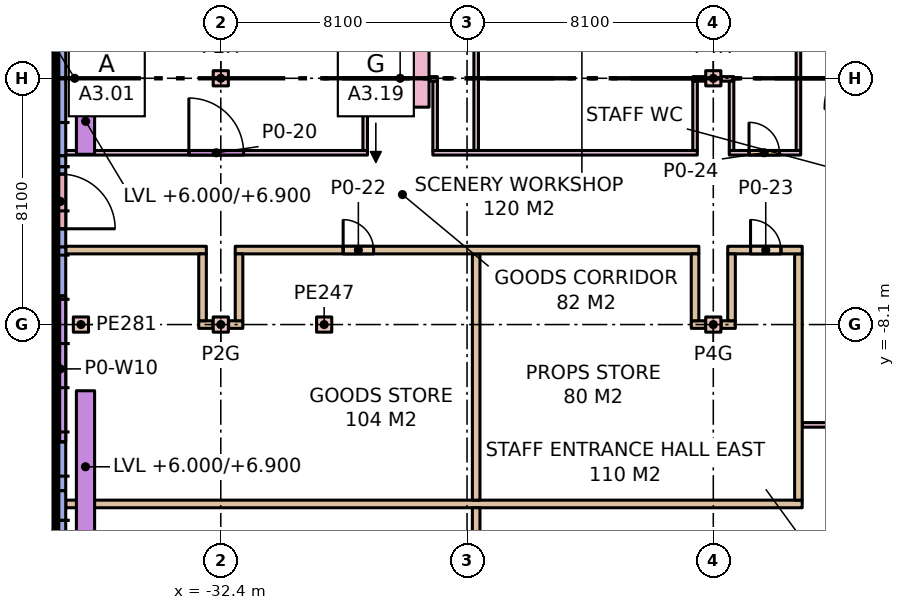
"""IFC4 building model, lengths in metres.
Left out: names, types, materials, properties, quantities, classifications, styles, units other than length and angle.
Written with IfcOpenShell. Run it as: python <this file> out.ifc"""

import sys

from ifc_helpers import new_model, si_unit, direction, frame, frame_2d, origin, origin_2d, place, context, subcontext, project, spatial, rectangle, extrude, element, fill, save


model = new_model("IFC4")
c1 = context("Model", 3, precision=1e-05, world=origin(), true_north=direction((0.0, 1.0)))
c2 = subcontext(c1, "Body", "Model", "MODEL_VIEW")
j1 = project(units=[si_unit("LENGTHUNIT", "METRE"), si_unit("PLANEANGLEUNIT", "RADIAN")], contexts=[c1])
p1 = place(None, origin())
s1 = spatial("IfcSite", under=j1, at=p1, CompositionType="ELEMENT")
p2 = place(p1, origin())
s2 = spatial("IfcBuilding", under=s1, at=p2, CompositionType="ELEMENT")
p3 = place(p2, origin())
s3 = spatial("IfcBuildingStorey", under=s2, at=p3, CompositionType="ELEMENT", Elevation=0.0)
for number, where, z_axis, x_axis in (
    (1, (-32.4, -8.1, 0.0), (0.0, 0.0, 1.0), (1.0, 0.0, 0.0)),
    (2, (-32.4, 0.0, 0.0), (0.0, 0.0, 1.0), (1.0, 0.0, 0.0)),
    (3, (-16.2, -8.1, 0.0), (0.0, 0.0, 1.0), (1.0, 0.0, 0.0)),
    (4, (-16.2, 0.0, 0.0), (0.0, 0.0, 1.0), (1.0, 0.0, 0.0)),
    (5, (-29.0, -8.1, 0.0), (0.0, 0.0, 1.0), (1.0, 0.0, 0.0)),
    (6, (-37.0, 0.0, 0.0), (0.0, 0.0, 1.0), (1.0, 0.0, 0.0)),
    (7, (-37.0, -8.1, 0.0), (0.0, 0.0, 1.0), (1.0, 0.0, 0.0)),
):
    element("IfcColumn", number, at=place(p3, frame(where, z_axis=z_axis, x_axis=x_axis)), inside=s3, PredefinedType="COLUMN", context=c2, shape_type="SweptSolid", body=[
        extrude(rectangle(XDim=0.5, YDim=0.5, at=origin_2d()), origin(), (0.0, 0.0, 1.0), 6.0),
    ])
p4 = place(p3, frame((-26.5, 0.0, 0.0), z_axis=(0.0, 0.0, 1.0), x_axis=(0.0, -1.0, 0.0)))
e8 = element("IfcColumn", 8, at=p4, inside=s3, PredefinedType="COLUMN", context=c2, shape_type="SweptSolid", body=[
    extrude(rectangle(XDim=1.9, YDim=1.9, at=origin_2d()), origin(), (0.0, 0.0, 1.0), 6.0),
])
p5 = place(p3, frame((-37.675, 1.2, 0.0), z_axis=(0.0, 0.0, 1.0), x_axis=(0.0, -1.0, 0.0)))
e9 = element("IfcWall", 9, at=p5, inside=s3, PredefinedType="STANDARD", context=c2, shape_type="SweptSolid", body=[
    extrude(rectangle(XDim=3.75, YDim=0.35, at=frame_2d((1.875, 0.0))), origin(), (0.0, 0.0, 1.0), 5.68),
])
p6 = place(p3, frame((-37.675, -2.55, 0.0), z_axis=(0.0, 0.0, 1.0), x_axis=(0.0, -1.0, 0.0)))
e10 = element("IfcWall", 10, at=p6, inside=s3, PredefinedType="STANDARD", context=c2, shape_type="SweptSolid", body=[
    extrude(rectangle(XDim=3.0, YDim=0.35, at=frame_2d((1.5, 0.0))), origin(), (0.0, 0.0, 1.0), 5.68),
])
p7 = place(p6, frame((0.6, 0.0, 0.0)))
e11 = element("IfcOpeningElement", 11, at=p7, cuts=e10, PredefinedType="OPENING", context=c2, shape_type="SweptSolid", body=[
    extrude(rectangle(XDim=1.8, YDim=2.4, at=frame_2d((0.9, 1.2))), frame((0.0, 0.185, 0.0), z_axis=(0.0, -1.0, 0.0), x_axis=(1.0, 0.0, 0.0)), (0.0, 0.0, 1.0), 0.37),
])
p8 = place(p3, frame((-37.675, -5.55, 0.0), z_axis=(0.0, 0.0, 1.0), x_axis=(0.0, -1.0, 0.0)))
e12 = element("IfcWall", 12, at=p8, inside=s3, PredefinedType="STANDARD", context=c2, shape_type="SweptSolid", body=[
    extrude(rectangle(XDim=8.017, YDim=0.35, at=frame_2d((4.008, 0.0))), origin(), (0.0, 0.0, 1.0), 5.68),
])
p9 = place(p8, frame((1.608, 0.0, 0.3)))
e13 = element("IfcOpeningElement", 13, at=p9, cuts=e12, PredefinedType="OPENING", context=c2, shape_type="SweptSolid", body=[
    extrude(rectangle(XDim=4.8, YDim=4.5, at=frame_2d((2.4, 2.25))), frame((0.0, 0.185, 0.0), z_axis=(0.0, -1.0, 0.0), x_axis=(1.0, 0.0, 0.0)), (0.0, 0.0, 1.0), 0.37),
])
p10 = place(p3, frame((-37.675, -13.567, 0.0), z_axis=(0.0, 0.0, 1.0), x_axis=(0.0, -1.0, 0.0)))
e14 = element("IfcWall", 14, at=p10, inside=s3, PredefinedType="STANDARD", context=c2, shape_type="SweptSolid", body=[
    extrude(rectangle(XDim=8.017, YDim=0.35, at=frame_2d((4.008, 0.0))), origin(), (0.0, 0.0, 1.0), 5.68),
])
p11 = place(p10, frame((1.608, 0.0, 0.3)))
e15 = element("IfcOpeningElement", 15, at=p11, cuts=e14, PredefinedType="OPENING", context=c2, shape_type="SweptSolid", body=[
    extrude(rectangle(XDim=4.8, YDim=4.5, at=frame_2d((2.4, 2.25))), frame((0.0, 0.185, 0.0), z_axis=(0.0, -1.0, 0.0), x_axis=(1.0, 0.0, 0.0)), (0.0, 0.0, 1.0), 0.37),
])
for number, where, z_axis, x_axis in (
    (16, (-36.85, 2.5, 6.0), (0.0, 0.0, 1.0), (0.0, -1.0, 0.0)),
    (17, (-36.85, -10.277, 6.0), (0.0, 0.0, 1.0), (0.0, -1.0, 0.0)),
):
    element("IfcWall", number, at=place(p3, frame(where, z_axis=z_axis, x_axis=x_axis)), inside=s3, PredefinedType="PARAPET", context=c2, shape_type="SweptSolid", body=[
        extrude(rectangle(XDim=5.0, YDim=0.6, at=frame_2d((2.5, 0.0))), origin(), (0.0, 0.0, 1.0), 0.9),
    ])
p12 = place(p3, frame((-37.5, -14.0, 0.0), z_axis=(0.0, 0.0, 1.0), x_axis=(1.0, 0.0, 0.0)))
e18 = element("IfcWall", 18, at=p12, inside=s3, PredefinedType="PARTITIONING", context=c2, shape_type="SweptSolid", body=[
    extrude(rectangle(XDim=24.225, YDim=0.25, at=frame_2d((12.113, 0.0))), origin(), (0.0, 0.0, 1.0), 5.68),
])
p13 = place(p3, frame((-24.0, -15.94, 0.0), z_axis=(0.0, 0.0, 1.0), x_axis=(0.0, 1.0, 0.0)))
e19 = element("IfcWall", 19, at=p13, inside=s3, PredefinedType="PARTITIONING", context=c2, shape_type="SweptSolid", body=[
    extrude(rectangle(XDim=1.815, YDim=0.25, at=frame_2d((0.907, 0.0))), origin(), (0.0, 0.0, 1.0), 5.68),
])
p14 = place(p3, frame((-24.0, -2.375, 0.0), z_axis=(0.0, 0.0, 1.0), x_axis=(0.0, 1.0, 0.0)))
e20 = element("IfcWall", 20, at=p14, inside=s3, PredefinedType="PARTITIONING", context=c2, shape_type="SweptSolid", body=[
    extrude(rectangle(XDim=16.25, YDim=0.15, at=frame_2d((8.125, 0.0))), origin(), (0.0, 0.0, 1.0), 5.68),
])
p15 = place(p3, frame((-37.5, -2.45, 0.0), z_axis=(0.0, 0.0, 1.0), x_axis=(1.0, 0.0, 0.0)))
e21 = element("IfcWall", 21, at=p15, inside=s3, PredefinedType="PARTITIONING", context=c2, shape_type="SweptSolid", body=[
    extrude(rectangle(XDim=9.925, YDim=0.15, at=frame_2d((4.962, 0.0))), origin(), (0.0, 0.0, 1.0), 5.68),
])
p16 = place(p15, frame((4.05, 0.0, 0.0)))
e22 = element("IfcOpeningElement", 22, at=p16, cuts=e21, PredefinedType="OPENING", context=c2, shape_type="SweptSolid", body=[
    extrude(rectangle(XDim=1.8, YDim=2.4, at=frame_2d((0.9, 1.2))), frame((0.0, 0.085, 0.0), z_axis=(0.0, -1.0, 0.0), x_axis=(1.0, 0.0, 0.0)), (0.0, 0.0, 1.0), 0.17),
])
p17 = place(p3, frame((-25.425, -2.45, 0.0), z_axis=(0.0, 0.0, 1.0), x_axis=(1.0, 0.0, 0.0)))
e23 = element("IfcWall", 23, at=p17, inside=s3, PredefinedType="PARTITIONING", context=c2, shape_type="SweptSolid", body=[
    extrude(rectangle(XDim=8.7, YDim=0.15, at=frame_2d((4.35, 0.0))), origin(), (0.0, 0.0, 1.0), 5.68),
])
for number, where, z_axis, x_axis in (
    (24, (-27.725, -0.02, 0.0), (0.0, 0.0, 1.0), (1.0, 0.0, 0.0)),
    (25, (-25.54, -0.02, 0.0), (0.0, 0.0, 1.0), (1.0, 0.0, 0.0)),
):
    element("IfcWall", number, at=place(p3, frame(where, z_axis=z_axis, x_axis=x_axis)), inside=s3, PredefinedType="PARTITIONING", context=c2, shape_type="SweptSolid", body=[
        extrude(rectangle(XDim=0.265, YDim=0.15, at=frame_2d((0.133, 0.0))), origin(), (0.0, 0.0, 1.0), 5.68),
    ])
for number, where, z_axis, x_axis in (
    (26, (-27.65, -2.375, 0.0), (0.0, 0.0, 1.0), (0.0, 1.0, 0.0)),
    (27, (-25.35, -2.375, 0.0), (0.0, 0.0, 1.0), (0.0, 1.0, 0.0)),
):
    element("IfcWall", number, at=place(p3, frame(where, z_axis=z_axis, x_axis=x_axis)), inside=s3, PredefinedType="PARTITIONING", context=c2, shape_type="SweptSolid", body=[
        extrude(rectangle(XDim=2.28, YDim=0.15, at=frame_2d((1.14, 0.0))), origin(), (0.0, 0.0, 1.0), 5.68),
    ])
p18 = place(p3, frame((-24.0, -13.875, 0.0), z_axis=(0.0, 0.0, 1.0), x_axis=(0.0, 1.0, 0.0)))
e28 = element("IfcWall", 28, at=p18, inside=s3, PredefinedType="PARTITIONING", context=c2, shape_type="SweptSolid", body=[
    extrude(rectangle(XDim=8.1, YDim=0.25, at=frame_2d((4.05, 0.0))), origin(), (0.0, 0.0, 1.0), 5.68),
])
p19 = place(p3, frame((-33.125, -8.1, 0.0), z_axis=(0.0, 0.0, 1.0), x_axis=(1.0, 0.0, 0.0)))
e29 = element("IfcWall", 29, at=p19, inside=s3, PredefinedType="PARTITIONING", context=c2, shape_type="SweptSolid", body=[
    extrude(rectangle(XDim=0.465, YDim=0.25, at=frame_2d((0.232, 0.0))), origin(), (0.0, 0.0, 1.0), 5.68),
])
p20 = place(p3, frame((-32.14, -8.1, 0.0), z_axis=(0.0, 0.0, 1.0), x_axis=(1.0, 0.0, 0.0)))
e30 = element("IfcWall", 30, at=p20, inside=s3, PredefinedType="PARTITIONING", context=c2, shape_type="SweptSolid", body=[
    extrude(rectangle(XDim=0.465, YDim=0.25, at=frame_2d((0.232, 0.0))), origin(), (0.0, 0.0, 1.0), 5.68),
])
p21 = place(p3, frame((-37.5, -5.65, 0.0), z_axis=(0.0, 0.0, 1.0), x_axis=(1.0, 0.0, 0.0)))
e31 = element("IfcWall", 31, at=p21, inside=s3, PredefinedType="PARTITIONING", context=c2, shape_type="SweptSolid", body=[
    extrude(rectangle(XDim=4.625, YDim=0.25, at=frame_2d((2.312, 0.0))), origin(), (0.0, 0.0, 1.0), 5.68),
])
p22 = place(p3, frame((-31.925, -5.65, 0.0), z_axis=(0.0, 0.0, 1.0), x_axis=(1.0, 0.0, 0.0)))
e32 = element("IfcWall", 32, at=p22, inside=s3, PredefinedType="PARTITIONING", context=c2, shape_type="SweptSolid", body=[
    extrude(rectangle(XDim=15.25, YDim=0.25, at=frame_2d((7.625, 0.0))), origin(), (0.0, 0.0, 1.0), 5.68),
])
p23 = place(p22, frame((3.55, 0.0, 0.0)))
e33 = element("IfcOpeningElement", 33, at=p23, cuts=e32, PredefinedType="OPENING", context=c2, shape_type="SweptSolid", body=[
    extrude(rectangle(XDim=1.0, YDim=2.1, at=frame_2d((0.5, 1.05))), frame((0.0, 0.135, 0.0), z_axis=(0.0, -1.0, 0.0), x_axis=(1.0, 0.0, 0.0)), (0.0, 0.0, 1.0), 0.27),
])
for number, where, z_axis, x_axis in (
    (34, (-33.0, -7.975, 0.0), (0.0, 0.0, 1.0), (0.0, 1.0, 0.0)),
    (35, (-31.8, -7.975, 0.0), (0.0, 0.0, 1.0), (0.0, 1.0, 0.0)),
):
    element("IfcWall", number, at=place(p3, frame(where, z_axis=z_axis, x_axis=x_axis)), inside=s3, PredefinedType="PARTITIONING", context=c2, shape_type="SweptSolid", body=[
        extrude(rectangle(XDim=2.2, YDim=0.25, at=frame_2d((1.1, 0.0))), origin(), (0.0, 0.0, 1.0), 5.68),
    ])
p24 = place(p3, frame((-13.4, -13.875, 0.0), z_axis=(0.0, 0.0, 1.0), x_axis=(0.0, 1.0, 0.0)))
e36 = element("IfcWall", 36, at=p24, inside=s3, PredefinedType="PARTITIONING", context=c2, shape_type="SweptSolid", body=[
    extrude(rectangle(XDim=8.1, YDim=0.25, at=frame_2d((4.05, 0.0))), origin(), (0.0, 0.0, 1.0), 5.68),
])
p25 = place(p3, frame((-16.925, -8.1, 0.0), z_axis=(0.0, 0.0, 1.0), x_axis=(1.0, 0.0, 0.0)))
e37 = element("IfcWall", 37, at=p25, inside=s3, PredefinedType="PARTITIONING", context=c2, shape_type="SweptSolid", body=[
    extrude(rectangle(XDim=0.465, YDim=0.25, at=frame_2d((0.232, 0.0))), origin(), (0.0, 0.0, 1.0), 5.68),
])
p26 = place(p3, frame((-15.94, -8.1, 0.0), z_axis=(0.0, 0.0, 1.0), x_axis=(1.0, 0.0, 0.0)))
e38 = element("IfcWall", 38, at=p26, inside=s3, PredefinedType="PARTITIONING", context=c2, shape_type="SweptSolid", body=[
    extrude(rectangle(XDim=0.465, YDim=0.25, at=frame_2d((0.232, 0.0))), origin(), (0.0, 0.0, 1.0), 5.68),
])
p27 = place(p3, frame((-15.725, -5.65, 0.0), z_axis=(0.0, 0.0, 1.0), x_axis=(1.0, 0.0, 0.0)))
e39 = element("IfcWall", 39, at=p27, inside=s3, PredefinedType="PARTITIONING", context=c2, shape_type="SweptSolid", body=[
    extrude(rectangle(XDim=2.45, YDim=0.25, at=frame_2d((1.225, 0.0))), origin(), (0.0, 0.0, 1.0), 5.68),
])
p28 = place(p27, frame((0.75, 0.0, 0.0)))
e40 = element("IfcOpeningElement", 40, at=p28, cuts=e39, PredefinedType="OPENING", context=c2, shape_type="SweptSolid", body=[
    extrude(rectangle(XDim=1.0, YDim=2.1, at=frame_2d((0.5, 1.05))), frame((0.0, 0.135, 0.0), z_axis=(0.0, -1.0, 0.0), x_axis=(1.0, 0.0, 0.0)), (0.0, 0.0, 1.0), 0.27),
])
for number, where, z_axis, x_axis in (
    (41, (-16.8, -7.975, 0.0), (0.0, 0.0, 1.0), (0.0, 1.0, 0.0)),
    (42, (-15.6, -7.975, 0.0), (0.0, 0.0, 1.0), (0.0, 1.0, 0.0)),
):
    element("IfcWall", number, at=place(p3, frame(where, z_axis=z_axis, x_axis=x_axis)), inside=s3, PredefinedType="PARTITIONING", context=c2, shape_type="SweptSolid", body=[
        extrude(rectangle(XDim=2.2, YDim=0.25, at=frame_2d((1.1, 0.0))), origin(), (0.0, 0.0, 1.0), 5.68),
    ])
p29 = place(p3, frame((-13.275, -11.4, 0.0), z_axis=(0.0, 0.0, 1.0), x_axis=(1.0, 0.0, 0.0)))
e43 = element("IfcWall", 43, at=p29, inside=s3, PredefinedType="PARTITIONING", context=c2, shape_type="SweptSolid", body=[
    extrude(rectangle(XDim=4.15, YDim=0.15, at=frame_2d((2.075, 0.0))), origin(), (0.0, 0.0, 1.0), 5.68),
])
p30 = place(p29, frame((1.15, 0.0, 0.0)))
e44 = element("IfcOpeningElement", 44, at=p30, cuts=e43, PredefinedType="OPENING", context=c2, shape_type="SweptSolid", body=[
    extrude(rectangle(XDim=1.8, YDim=2.4, at=frame_2d((0.9, 1.2))), frame((0.0, 0.085, 0.0), z_axis=(0.0, -1.0, 0.0), x_axis=(1.0, 0.0, 0.0)), (0.0, 0.0, 1.0), 0.17),
])
p31 = place(p3, frame((-13.4, -2.375, 0.0), z_axis=(0.0, 0.0, 1.0), x_axis=(0.0, 1.0, 0.0)))
e45 = element("IfcWall", 45, at=p31, inside=s3, PredefinedType="PARTITIONING", context=c2, shape_type="SweptSolid", body=[
    extrude(rectangle(XDim=4.05, YDim=0.15, at=frame_2d((2.025, 0.0))), origin(), (0.0, 0.0, 1.0), 5.68),
])
p32 = place(p3, frame((-15.675, -2.45, 0.0), z_axis=(0.0, 0.0, 1.0), x_axis=(1.0, 0.0, 0.0)))
e46 = element("IfcWall", 46, at=p32, inside=s3, PredefinedType="PARTITIONING", context=c2, shape_type="SweptSolid", body=[
    extrude(rectangle(XDim=2.35, YDim=0.15, at=frame_2d((1.175, 0.0))), origin(), (0.0, 0.0, 1.0), 5.68),
])
p33 = place(p32, frame((0.65, 0.0, 0.0)))
e47 = element("IfcOpeningElement", 47, at=p33, cuts=e46, PredefinedType="OPENING", context=c2, shape_type="SweptSolid", body=[
    extrude(rectangle(XDim=1.0, YDim=2.1, at=frame_2d((0.5, 1.05))), frame((0.0, 0.085, 0.0), z_axis=(0.0, -1.0, 0.0), x_axis=(1.0, 0.0, 0.0)), (0.0, 0.0, 1.0), 0.17),
])
for number, where, z_axis, x_axis in (
    (48, (-16.875, -0.02, 0.0), (0.0, 0.0, 1.0), (1.0, 0.0, 0.0)),
    (49, (-15.94, -0.02, 0.0), (0.0, 0.0, 1.0), (1.0, 0.0, 0.0)),
):
    element("IfcWall", number, at=place(p3, frame(where, z_axis=z_axis, x_axis=x_axis)), inside=s3, PredefinedType="PARTITIONING", context=c2, shape_type="SweptSolid", body=[
        extrude(rectangle(XDim=0.415, YDim=0.15, at=frame_2d((0.208, 0.0))), origin(), (0.0, 0.0, 1.0), 5.68),
    ])
for number, where, z_axis, x_axis in (
    (50, (-16.8, -2.375, 0.0), (0.0, 0.0, 1.0), (0.0, 1.0, 0.0)),
    (51, (-15.6, -2.375, 0.0), (0.0, 0.0, 1.0), (0.0, 1.0, 0.0)),
):
    element("IfcWall", number, at=place(p3, frame(where, z_axis=z_axis, x_axis=x_axis)), inside=s3, PredefinedType="PARTITIONING", context=c2, shape_type="SweptSolid", body=[
        extrude(rectangle(XDim=2.28, YDim=0.15, at=frame_2d((1.14, 0.0))), origin(), (0.0, 0.0, 1.0), 5.68),
    ])
p34 = place(p9, origin())
e52 = element("IfcWindow", 52, at=p34, inside=s3, PartitioningType="SINGLE_PANEL", PredefinedType="WINDOW", context=c2, shape_type="SweptSolid", body=[
    extrude(rectangle(XDim=4.8, YDim=4.5, at=frame_2d((2.4, 2.25))), frame((0.0, 0.03, 0.0), z_axis=(0.0, -1.0, 0.0), x_axis=(1.0, 0.0, 0.0)), (0.0, 0.0, 1.0), 0.06),
])
fill(e13, e52)
p35 = place(p16, origin())
e53 = element("IfcDoor", 53, at=p35, inside=s3, OperationType="SINGLE_SWING_LEFT", PredefinedType="DOOR", context=c2, shape_type="SweptSolid", body=[
    extrude(rectangle(XDim=1.8, YDim=2.4, at=frame_2d((0.9, 1.2))), frame((0.0, 0.025, 0.0), z_axis=(0.0, -1.0, 0.0), x_axis=(1.0, 0.0, 0.0)), (0.0, 0.0, 1.0), 0.05),
])
fill(e22, e53)
p36 = place(p23, origin())
e54 = element("IfcDoor", 54, at=p36, inside=s3, OperationType="SINGLE_SWING_LEFT", PredefinedType="DOOR", context=c2, shape_type="SweptSolid", body=[
    extrude(rectangle(XDim=1.0, YDim=2.1, at=frame_2d((0.5, 1.05))), frame((0.0, 0.025, 0.0), z_axis=(0.0, -1.0, 0.0), x_axis=(1.0, 0.0, 0.0)), (0.0, 0.0, 1.0), 0.05),
])
fill(e33, e54)
p37 = place(p28, origin())
e55 = element("IfcDoor", 55, at=p37, inside=s3, OperationType="SINGLE_SWING_LEFT", PredefinedType="DOOR", context=c2, shape_type="SweptSolid", body=[
    extrude(rectangle(XDim=1.0, YDim=2.1, at=frame_2d((0.5, 1.05))), frame((0.0, 0.025, 0.0), z_axis=(0.0, -1.0, 0.0), x_axis=(1.0, 0.0, 0.0)), (0.0, 0.0, 1.0), 0.05),
])
fill(e40, e55)
p38 = place(p33, origin())
e56 = element("IfcDoor", 56, at=p38, inside=s3, OperationType="SINGLE_SWING_LEFT", PredefinedType="DOOR", context=c2, shape_type="SweptSolid", body=[
    extrude(rectangle(XDim=1.0, YDim=2.1, at=frame_2d((0.5, 1.05))), frame((0.0, 0.025, 0.0), z_axis=(0.0, -1.0, 0.0), x_axis=(1.0, 0.0, 0.0)), (0.0, 0.0, 1.0), 0.05),
])
fill(e47, e56)
p39 = place(p7, frame((1.8, 0.0, 0.0), z_axis=(0.0, 0.0, 1.0), x_axis=(-1.0, 0.0, 0.0)))
e57 = element("IfcDoor", 57, at=p39, inside=s3, OperationType="SINGLE_SWING_RIGHT", PredefinedType="DOOR", context=c2, shape_type="SweptSolid", body=[
    extrude(rectangle(XDim=1.8, YDim=2.4, at=frame_2d((0.9, 1.2))), frame((0.0, 0.025, 0.0), z_axis=(0.0, -1.0, 0.0), x_axis=(1.0, 0.0, 0.0)), (0.0, 0.0, 1.0), 0.05),
])
fill(e11, e57)
save(model, sys.argv[1])
